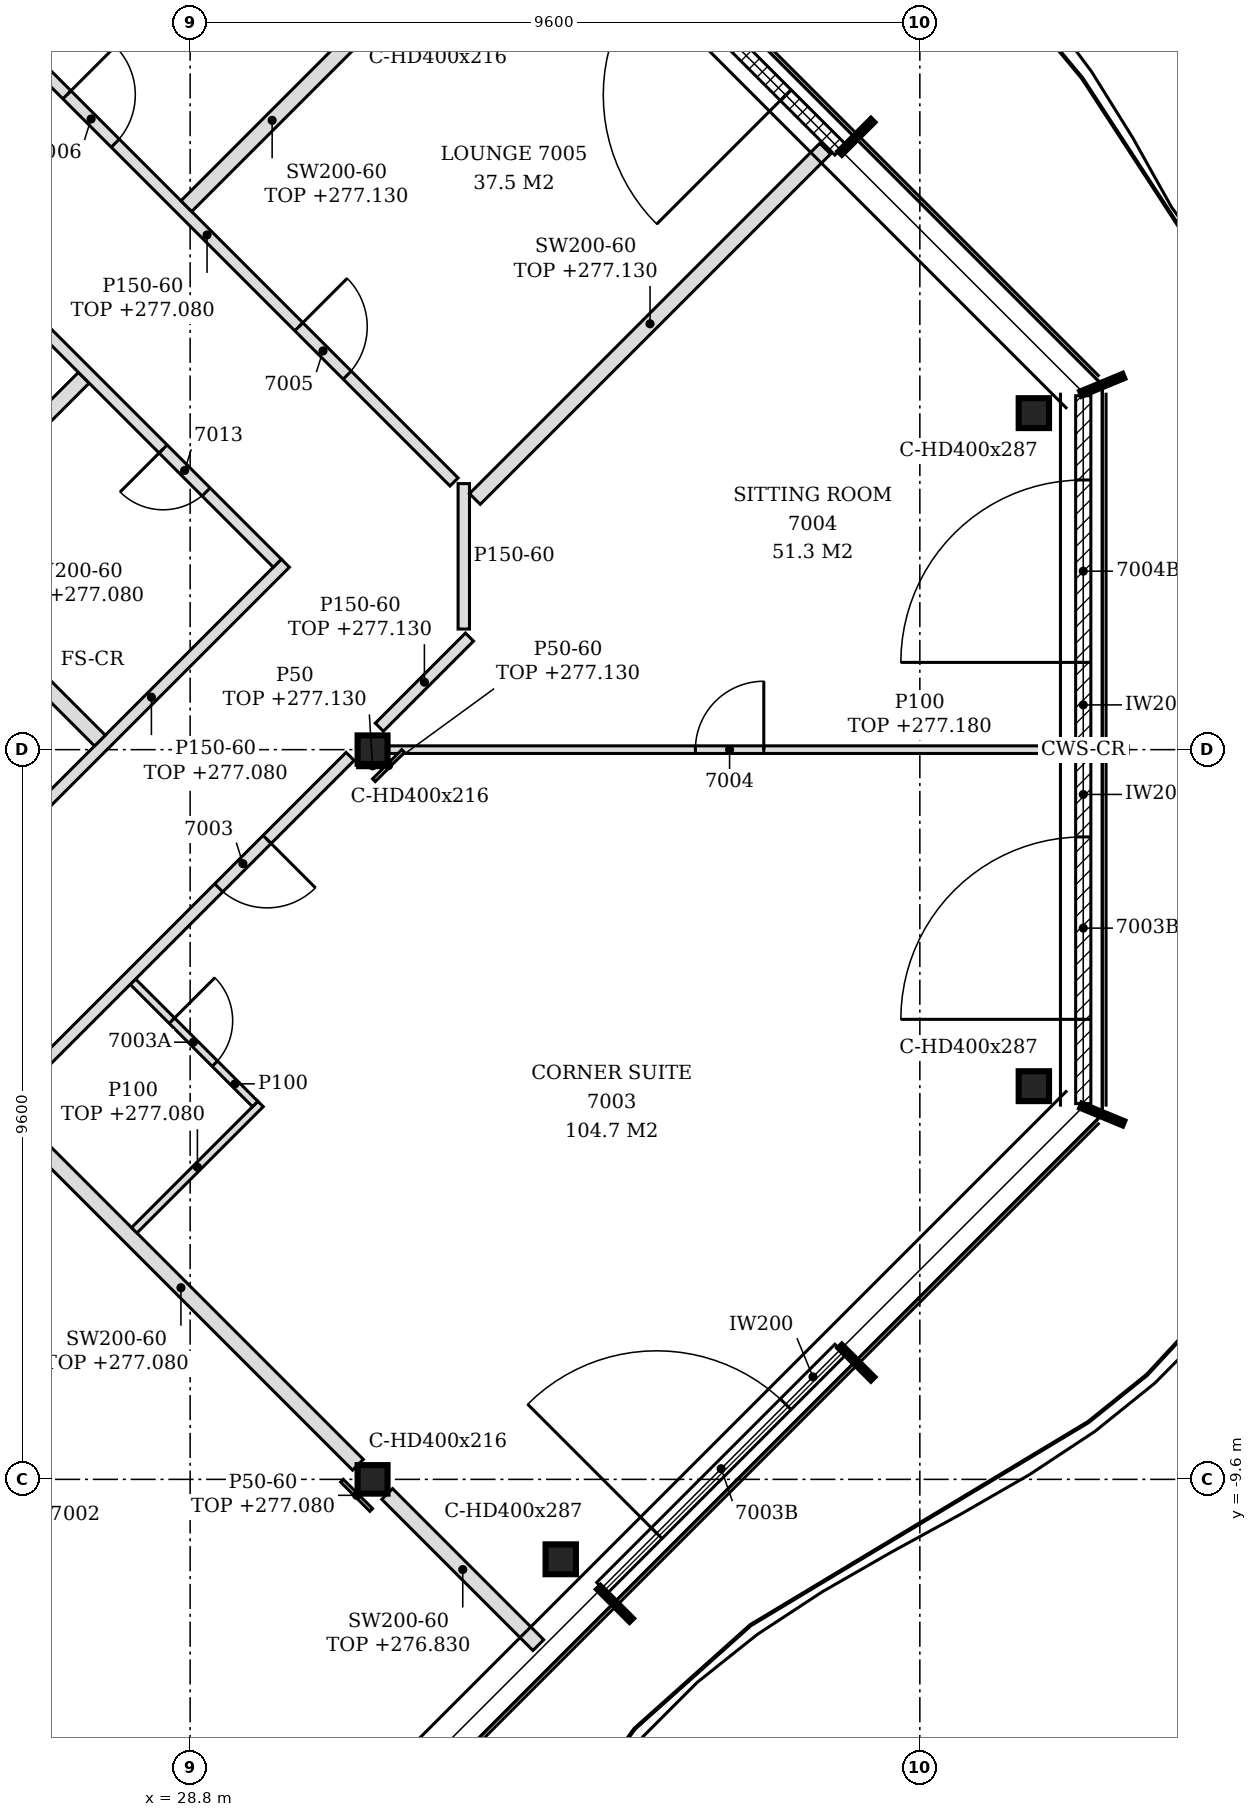
"""IFC4 building model, lengths in metres.
Left out: names, types, materials, properties, quantities, classifications, styles, units other than length and angle.
Written with IfcOpenShell. Run it as: python <this file> out.ifc"""

import sys

from ifc_helpers import new_model, si_unit, direction, frame, frame_2d, origin, origin_2d, place, context, subcontext, project, spatial, polyline, rectangle, i_section, outline, extrude, element, fill, save


model = new_model("IFC4")
c1 = context("Model", 3, precision=1e-05, world=origin(), true_north=direction((0.0, 1.0)))
c2 = subcontext(c1, "Body", "Model", "MODEL_VIEW")
j1 = project(units=[si_unit("LENGTHUNIT", "METRE"), si_unit("PLANEANGLEUNIT", "RADIAN")], contexts=[c1])
p1 = place(None, origin())
s1 = spatial("IfcSite", under=j1, at=p1, CompositionType="ELEMENT")
p2 = place(p1, origin())
s2 = spatial("IfcBuilding", under=s1, at=p2, CompositionType="ELEMENT")
p3 = place(p2, frame((0.0, 0.0, 274.2)))
s3 = spatial("IfcBuildingStorey", under=s2, at=p3, CompositionType="ELEMENT", Elevation=274.2)
for number, where, z_axis, x_axis in (
    (1, (33.676, -10.652, -0.15), (0.0, 0.0, 1.0), (1.0, 0.0, 0.0)),
    (2, (39.9, -4.427, -0.15), (0.0, 0.0, 1.0), (1.0, 0.0, 0.0)),
    (3, (39.9, 4.427, -0.15), (0.0, 0.0, 1.0), (1.0, 0.0, 0.0)),
):
    element("IfcColumn", number, at=place(p3, frame(where, z_axis=z_axis, x_axis=x_axis)), inside=s3, PredefinedType="COLUMN", context=c2, shape_type="SweptSolid", body=[
        extrude(i_section(OverallWidth=0.399, OverallDepth=0.393, WebThickness=0.023, FlangeThickness=0.037, FilletRadius=0.015, at=origin_2d()), origin(), (0.0, 0.0, 1.0), 3.6),
    ])
for number, where, z_axis, x_axis in (
    (4, (31.2, -9.6, -0.15), (0.0, 0.0, 1.0), (1.0, 0.0, 0.0)),
    (5, (31.2, 0.0, -0.15), (0.0, 0.0, 1.0), (1.0, 0.0, 0.0)),
):
    element("IfcColumn", number, at=place(p3, frame(where, z_axis=z_axis, x_axis=x_axis)), inside=s3, PredefinedType="COLUMN", context=c2, shape_type="SweptSolid", body=[
        extrude(i_section(OverallWidth=0.394, OverallDepth=0.375, WebThickness=0.017, FlangeThickness=0.028, FilletRadius=0.015, at=origin_2d()), origin(), (0.0, 0.0, 1.0), 3.6),
    ])
p4 = place(p3, frame((34.22, -11.026, 0.0), z_axis=(0.0, 0.0, 1.0), x_axis=(0.707134329907, 0.707079231393, 0.0)))
e6 = element("IfcWall", 6, at=p4, inside=s3, PredefinedType="NOTDEFINED", context=c2, shape_type="SweptSolid", body=[
    extrude(rectangle(XDim=4.431, YDim=0.2, at=frame_2d((2.215, 0.0))), origin(), (0.0, 0.0, 1.0), 3.45),
])
p5 = place(p4, frame((1.015, 0.0, 0.0)))
e7 = element("IfcOpeningElement", 7, at=p5, cuts=e6, PredefinedType="OPENING", context=c2, shape_type="SweptSolid", body=[
    extrude(rectangle(XDim=2.4, YDim=2.4, at=frame_2d((1.2, 1.2))), frame((0.0, 0.11, 0.0), z_axis=(0.0, -1.0, 0.0), x_axis=(1.0, 0.0, 0.0)), (0.0, 0.0, 1.0), 0.22),
])
p6 = place(p3, frame((40.55, -4.656, 0.0), z_axis=(0.0, 0.0, 1.0), x_axis=(0.0, 1.0, 0.0)))
e8 = element("IfcWall", 8, at=p6, inside=s3, PredefinedType="NOTDEFINED", context=c2, shape_type="SweptSolid", body=[
    extrude(rectangle(XDim=4.626, YDim=0.2, at=frame_2d((2.313, 0.0))), origin(), (0.0, 0.0, 1.0), 3.45),
])
p7 = place(p6, frame((1.108, 0.0, 0.0)))
e9 = element("IfcOpeningElement", 9, at=p7, cuts=e8, PredefinedType="OPENING", context=c2, shape_type="SweptSolid", body=[
    extrude(rectangle(XDim=2.4, YDim=2.4, at=frame_2d((1.2, 1.2))), frame((0.0, 0.11, 0.0), z_axis=(0.0, -1.0, 0.0), x_axis=(1.0, 0.0, 0.0)), (0.0, 0.0, 1.0), 0.22),
])
p8 = place(p3, frame((40.55, 0.03, 0.0), z_axis=(0.0, 0.0, 1.0), x_axis=(0.0, 1.0, 0.0)))
e10 = element("IfcWall", 10, at=p8, inside=s3, PredefinedType="NOTDEFINED", context=c2, shape_type="SweptSolid", body=[
    extrude(rectangle(XDim=4.626, YDim=0.2, at=frame_2d((2.313, 0.0))), origin(), (0.0, 0.0, 1.0), 3.45),
])
p9 = place(p8, frame((1.118, 0.0, 0.0)))
e11 = element("IfcOpeningElement", 11, at=p9, cuts=e10, PredefinedType="OPENING", context=c2, shape_type="SweptSolid", body=[
    extrude(rectangle(XDim=2.4, YDim=2.4, at=frame_2d((1.2, 1.2))), frame((0.0, 0.11, 0.0), z_axis=(0.0, -1.0, 0.0), x_axis=(1.0, 0.0, 0.0)), (0.0, 0.0, 1.0), 0.22),
])
p10 = place(p3, frame((37.353, 7.893, 0.0), z_axis=(0.0, 0.0, 1.0), x_axis=(-0.707134329907, 0.707079231393, 0.0)))
e12 = element("IfcWall", 12, at=p10, inside=s3, PredefinedType="NOTDEFINED", context=c2, shape_type="SweptSolid", body=[
    extrude(rectangle(XDim=4.431, YDim=0.2, at=frame_2d((2.215, 0.0))), origin(), (0.0, 0.0, 1.0), 3.45),
])
p11 = place(p10, frame((1.015, 0.0, 0.0)))
e13 = element("IfcOpeningElement", 13, at=p11, cuts=e12, PredefinedType="OPENING", context=c2, shape_type="SweptSolid", body=[
    extrude(rectangle(XDim=2.4, YDim=2.4, at=frame_2d((1.2, 1.2))), frame((0.0, 0.11, 0.0), z_axis=(0.0, -1.0, 0.0), x_axis=(1.0, 0.0, 0.0)), (0.0, 0.0, 1.0), 0.22),
])
p12 = place(p3, frame((13.122, -17.872, 0.0), z_axis=(0.0, 0.0, 1.0), x_axis=(0.707101927234, 0.707111635106, 0.0)))
e14 = element("IfcWall", 14, at=p12, inside=s3, PredefinedType="PARTITIONING", context=c2, shape_type="SweptSolid", body=[
    extrude(rectangle(XDim=25.149, YDim=0.15, at=frame_2d((12.574, 0.0))), origin(), (0.0, 0.0, 1.0), 2.73),
])
p13 = place(p12, frame((4.672, 0.0, 0.0)))
e15 = element("IfcOpeningElement", 15, at=p13, cuts=e14, PredefinedType="OPENING", context=c2, shape_type="SweptSolid", body=[
    extrude(rectangle(XDim=0.9, YDim=2.1, at=frame_2d((0.45, 1.05))), frame((0.0, 0.085, 0.0), z_axis=(0.0, -1.0, 0.0), x_axis=(1.0, 0.0, 0.0)), (0.0, 0.0, 1.0), 0.17),
])
p14 = place(p12, frame((14.284, 0.0, 0.0)))
e16 = element("IfcOpeningElement", 16, at=p14, cuts=e14, PredefinedType="OPENING", context=c2, shape_type="SweptSolid", body=[
    extrude(rectangle(XDim=0.9, YDim=2.1, at=frame_2d((0.45, 1.05))), frame((0.0, 0.085, 0.0), z_axis=(0.0, -1.0, 0.0), x_axis=(1.0, 0.0, 0.0)), (0.0, 0.0, 1.0), 0.17),
])
p15 = place(p12, frame((22.704, 0.0, 0.0)))
e17 = element("IfcOpeningElement", 17, at=p15, cuts=e14, PredefinedType="OPENING", context=c2, shape_type="SweptSolid", body=[
    extrude(rectangle(XDim=0.9, YDim=2.1, at=frame_2d((0.45, 1.05))), frame((0.0, 0.085, 0.0), z_axis=(0.0, -1.0, 0.0), x_axis=(1.0, 0.0, 0.0)), (0.0, 0.0, 1.0), 0.17),
])
p16 = place(p3, frame((27.254, -16.677, 0.0), z_axis=(0.0, 0.0, 1.0), x_axis=(-0.707120235152, 0.707093326965, 0.0)))
e18 = element("IfcWall", 18, at=p16, inside=s3, PredefinedType="PARTITIONING", context=c2, shape_type="SweptSolid", body=[
    extrude(rectangle(XDim=9.073, YDim=0.2, at=frame_2d((4.537, 0.0))), origin(), (0.0, 0.0, 1.0), 2.93),
])
p17 = place(p3, frame((33.381, -11.781, 0.0), z_axis=(0.0, 0.0, 1.0), x_axis=(-0.707106781187, 0.707106781187, 0.0)))
e19 = element("IfcWall", 19, at=p17, inside=s3, PredefinedType="PARTITIONING", context=c2, shape_type="SweptSolid", body=[
    extrude(rectangle(XDim=2.812, YDim=0.2, at=frame_2d((1.406, 0.0))), origin(), (0.0, 0.0, 1.0), 2.63),
])
p18 = place(p3, frame((31.008, -9.408, 0.0), z_axis=(0.0, 0.0, 1.0), x_axis=(-0.707106781187, 0.707106781187, 0.0)))
e20 = element("IfcWall", 20, at=p18, inside=s3, PredefinedType="PARTITIONING", context=c2, shape_type="SweptSolid", body=[
    extrude(rectangle(XDim=6.587, YDim=0.2, at=frame_2d((3.293, 0.0))), origin(), (0.0, 0.0, 1.0), 2.88),
])
p19 = place(p3, frame((28.065, -6.323, 0.0), z_axis=(0.0, 0.0, 1.0), x_axis=(0.707106781187, 0.707106781187, 0.0)))
e21 = element("IfcWall", 21, at=p19, inside=s3, PredefinedType="PARTITIONING", context=c2, shape_type="SweptSolid", body=[
    extrude(rectangle(XDim=2.35, YDim=0.1, at=frame_2d((1.175, 0.0))), origin(), (0.0, 0.0, 1.0), 2.88),
])
p20 = place(p3, frame((29.656, -4.662, 0.0), z_axis=(0.0, 0.0, 1.0), x_axis=(-0.707053116953, 0.707160441348, 0.0)))
e22 = element("IfcWall", 22, at=p20, inside=s3, PredefinedType="PARTITIONING", context=c2, shape_type="SweptSolid", body=[
    extrude(rectangle(XDim=2.275, YDim=0.1, at=frame_2d((1.137, 0.0))), origin(), (0.0, 0.0, 1.0), 3.45),
])
p21 = place(p20, frame((0.75, 0.0, 0.0)))
e23 = element("IfcOpeningElement", 23, at=p21, cuts=e22, PredefinedType="OPENING", context=c2, shape_type="SweptSolid", body=[
    extrude(rectangle(XDim=0.8, YDim=2.1, at=frame_2d((0.4, 1.05))), frame((0.0, 0.06, 0.0), z_axis=(0.0, -1.0, 0.0), x_axis=(1.0, 0.0, 0.0)), (0.0, 0.0, 1.0), 0.12),
])
p22 = place(p3, frame((26.528, -1.072, 0.0), z_axis=(0.0, 0.0, 1.0), x_axis=(0.707106781187, 0.707106781187, 0.0)))
e24 = element("IfcWall", 24, at=p22, inside=s3, PredefinedType="PARTITIONING", context=c2, shape_type="SweptSolid", body=[
    extrude(rectangle(XDim=4.985, YDim=0.15, at=frame_2d((2.492, 0.0))), origin(), (0.0, 0.0, 1.0), 2.88),
])
p23 = place(p3, frame((31.397, 0.0, 0.0), z_axis=(0.0, 0.0, 1.0), x_axis=(1.0, 0.0, 0.0)))
e25 = element("IfcWall", 25, at=p23, inside=s3, PredefinedType="PARTITIONING", context=c2, shape_type="SweptSolid", body=[
    extrude(outline(polyline([(0.0, 0.0), (9.053, 0.0), (9.053, 2.98), (8.653, 2.98), (8.651, 2.93), (8.353, 2.93), (8.351, 2.98), (0.0, 2.98), (0.0, 0.0)])), frame((0.0, 0.05, 0.0), z_axis=(0.0, -1.0, 0.0), x_axis=(1.0, 0.0, 0.0)), (0.0, 0.0, 1.0), 0.1),
])
p24 = place(p23, frame((4.05, 0.0, 0.0)))
e26 = element("IfcOpeningElement", 26, at=p24, cuts=e25, PredefinedType="OPENING", context=c2, shape_type="SweptSolid", body=[
    extrude(rectangle(XDim=0.9, YDim=2.1, at=frame_2d((0.45, 1.05))), frame((0.0, 0.06, 0.0), z_axis=(0.0, -1.0, 0.0), x_axis=(1.0, 0.0, 0.0)), (0.0, 0.0, 1.0), 0.12),
])
p25 = place(p3, frame((27.613, 0.119, 0.0), z_axis=(0.0, 0.0, 1.0), x_axis=(-0.706999846325, 0.707213699878, 0.0)))
e27 = element("IfcWall", 27, at=p25, inside=s3, PredefinedType="PARTITIONING", context=c2, shape_type="SweptSolid", body=[
    extrude(rectangle(XDim=3.425, YDim=0.2, at=frame_2d((1.712, 0.0))), origin(), (0.0, 0.0, 1.0), 2.88),
])
p26 = place(p3, frame((31.289, 0.295, 0.0), z_axis=(0.0, 0.0, 1.0), x_axis=(0.707106781187, 0.707106781187, 0.0)))
e28 = element("IfcWall", 28, at=p26, inside=s3, PredefinedType="PARTITIONING", context=c2, shape_type="SweptSolid", body=[
    extrude(rectangle(XDim=1.677, YDim=0.15, at=frame_2d((0.838, 0.0))), origin(), (0.0, 0.0, 1.0), 2.93),
])
p27 = place(p3, frame((32.4, 1.587, 0.0), z_axis=(0.0, 0.0, 1.0), x_axis=(0.0, 1.0, 0.0)))
e29 = element("IfcWall", 29, at=p27, inside=s3, PredefinedType="PARTITIONING", context=c2, shape_type="SweptSolid", body=[
    extrude(rectangle(XDim=1.913, YDim=0.15, at=frame_2d((0.957, 0.0))), origin(), (0.0, 0.0, 1.0), 3.45),
])
p28 = place(p3, frame((25.05, 2.541, 0.0), z_axis=(0.0, 0.0, 1.0), x_axis=(0.706959910949, 0.707253620925, 0.0)))
e30 = element("IfcWall", 30, at=p28, inside=s3, PredefinedType="PARTITIONING", context=c2, shape_type="SweptSolid", body=[
    extrude(rectangle(XDim=3.325, YDim=0.2, at=frame_2d((1.663, 0.0))), origin(), (0.0, 0.0, 1.0), 2.88),
])
p29 = place(p3, frame((29.947, 2.453, 0.0), z_axis=(0.0, 0.0, 1.0), x_axis=(-0.707098603185, 0.707114959093, 0.0)))
e31 = element("IfcWall", 31, at=p29, inside=s3, PredefinedType="PARTITIONING", context=c2, shape_type="SweptSolid", body=[
    extrude(rectangle(XDim=14.927, YDim=0.15, at=frame_2d((7.463, 0.0))), origin(), (0.0, 0.0, 1.0), 2.88),
])
p30 = place(p29, frame((1.325, 0.0, 0.0)))
e32 = element("IfcOpeningElement", 32, at=p30, cuts=e31, PredefinedType="OPENING", context=c2, shape_type="SweptSolid", body=[
    extrude(rectangle(XDim=0.8, YDim=2.1, at=frame_2d((0.4, 1.05))), frame((0.0, 0.085, 0.0), z_axis=(0.0, -1.0, 0.0), x_axis=(1.0, 0.0, 0.0)), (0.0, 0.0, 1.0), 0.17),
])
p31 = place(p3, frame((32.546, 3.298, 0.0), z_axis=(0.0, 0.0, 1.0), x_axis=(0.707106781187, 0.707106781187, 0.0)))
e33 = element("IfcWall", 33, at=p31, inside=s3, PredefinedType="PARTITIONING", context=c2, shape_type="SweptSolid", body=[
    extrude(rectangle(XDim=6.519, YDim=0.2, at=frame_2d((3.26, 0.0))), origin(), (0.0, 0.0, 1.0), 2.93),
])
p32 = place(p3, frame((32.272, 3.522, 0.0), z_axis=(0.0, 0.0, 1.0), x_axis=(-0.707106781187, 0.707106781187, 0.0)))
e34 = element("IfcWall", 34, at=p32, inside=s3, PredefinedType="PARTITIONING", context=c2, shape_type="SweptSolid", body=[
    extrude(rectangle(XDim=13.687, YDim=0.15, at=frame_2d((6.843, 0.0))), origin(), (0.0, 0.0, 1.0), 2.88),
])
p33 = place(p32, frame((1.988, 0.0, 0.0)))
e35 = element("IfcOpeningElement", 35, at=p33, cuts=e34, PredefinedType="OPENING", context=c2, shape_type="SweptSolid", body=[
    extrude(rectangle(XDim=0.9, YDim=2.1, at=frame_2d((0.45, 1.05))), frame((0.0, 0.085, 0.0), z_axis=(0.0, -1.0, 0.0), x_axis=(1.0, 0.0, 0.0)), (0.0, 0.0, 1.0), 0.17),
])
p34 = place(p32, frame((6.303, 0.0, 0.0)))
e36 = element("IfcOpeningElement", 36, at=p34, cuts=e34, PredefinedType="OPENING", context=c2, shape_type="SweptSolid", body=[
    extrude(rectangle(XDim=0.9, YDim=2.1, at=frame_2d((0.45, 1.05))), frame((0.0, 0.085, 0.0), z_axis=(0.0, -1.0, 0.0), x_axis=(1.0, 0.0, 0.0)), (0.0, 0.0, 1.0), 0.17),
])
p35 = place(p32, frame((10.2, 0.0, 0.0)))
e37 = element("IfcOpeningElement", 37, at=p35, cuts=e34, PredefinedType="OPENING", context=c2, shape_type="SweptSolid", body=[
    extrude(rectangle(XDim=0.9, YDim=2.1, at=frame_2d((0.45, 1.05))), frame((0.0, 0.085, 0.0), z_axis=(0.0, -1.0, 0.0), x_axis=(1.0, 0.0, 0.0)), (0.0, 0.0, 1.0), 0.17),
])
p36 = place(p3, frame((28.75, 7.15, 0.0), z_axis=(0.0, 0.0, 1.0), x_axis=(0.707106781187, 0.707106781187, 0.0)))
e38 = element("IfcWall", 38, at=p36, inside=s3, PredefinedType="PARTITIONING", context=c2, shape_type="SweptSolid", body=[
    extrude(rectangle(XDim=3.193, YDim=0.2, at=frame_2d((1.597, 0.0))), origin(), (0.0, 0.0, 1.0), 2.93),
])
p37 = place(p3, frame((31.218, -0.402, 0.0), z_axis=(0.0, 0.0, 1.0), x_axis=(0.707106781187, 0.707106781187, 0.0)))
e39 = element("IfcWall", 39, at=p37, inside=s3, PredefinedType="PARTITIONING", context=c2, shape_type="SweptSolid", body=[
    extrude(rectangle(XDim=0.544, YDim=0.05, at=frame_2d((0.272, 0.0))), origin(), (0.0, 0.0, 1.0), 2.93),
])
p38 = place(p3, frame((31.182, -10.002, 0.0), z_axis=(0.0, 0.0, 1.0), x_axis=(-0.707106781187, 0.707106781187, 0.0)))
e40 = element("IfcWall", 40, at=p38, inside=s3, PredefinedType="PARTITIONING", context=c2, shape_type="SweptSolid", body=[
    extrude(rectangle(XDim=0.544, YDim=0.05, at=frame_2d((0.272, 0.0))), origin(), (0.0, 0.0, 1.0), 2.88),
])
p39 = place(p3, frame((31.003, -0.212, 0.0), z_axis=(0.0, 0.0, 1.0), x_axis=(1.0, 0.0, 0.0)))
e41 = element("IfcWall", 41, at=p39, inside=s3, PredefinedType="PARTITIONING", context=c2, shape_type="SweptSolid", body=[
    extrude(rectangle(XDim=0.394, YDim=0.05, at=frame_2d((0.197, 0.0))), origin(), (0.0, 0.0, 1.0), 2.93),
])
p40 = place(p5, origin())
e42 = element("IfcDoor", 42, at=p40, inside=s3, OperationType="SINGLE_SWING_LEFT", PredefinedType="DOOR", context=c2, shape_type="SweptSolid", body=[
    extrude(rectangle(XDim=2.4, YDim=2.4, at=frame_2d((1.2, 1.2))), frame((0.0, 0.025, 0.0), z_axis=(0.0, -1.0, 0.0), x_axis=(1.0, 0.0, 0.0)), (0.0, 0.0, 1.0), 0.05),
])
fill(e7, e42)
p41 = place(p7, origin())
e43 = element("IfcDoor", 43, at=p41, inside=s3, OperationType="SINGLE_SWING_LEFT", PredefinedType="DOOR", context=c2, shape_type="SweptSolid", body=[
    extrude(rectangle(XDim=2.4, YDim=2.4, at=frame_2d((1.2, 1.2))), frame((0.0, 0.025, 0.0), z_axis=(0.0, -1.0, 0.0), x_axis=(1.0, 0.0, 0.0)), (0.0, 0.0, 1.0), 0.05),
])
fill(e9, e43)
p42 = place(p9, origin())
e44 = element("IfcDoor", 44, at=p42, inside=s3, OperationType="SINGLE_SWING_LEFT", PredefinedType="DOOR", context=c2, shape_type="SweptSolid", body=[
    extrude(rectangle(XDim=2.4, YDim=2.4, at=frame_2d((1.2, 1.2))), frame((0.0, 0.025, 0.0), z_axis=(0.0, -1.0, 0.0), x_axis=(1.0, 0.0, 0.0)), (0.0, 0.0, 1.0), 0.05),
])
fill(e11, e44)
p43 = place(p11, origin())
e45 = element("IfcDoor", 45, at=p43, inside=s3, OperationType="SINGLE_SWING_LEFT", PredefinedType="DOOR", context=c2, shape_type="SweptSolid", body=[
    extrude(rectangle(XDim=2.4, YDim=2.4, at=frame_2d((1.2, 1.2))), frame((0.0, 0.025, 0.0), z_axis=(0.0, -1.0, 0.0), x_axis=(1.0, 0.0, 0.0)), (0.0, 0.0, 1.0), 0.05),
])
fill(e13, e45)
p44 = place(p15, frame((0.9, 0.0, 0.0), z_axis=(0.0, 0.0, 1.0), x_axis=(-1.0, 0.0, 0.0)))
e46 = element("IfcDoor", 46, at=p44, inside=s3, OperationType="SINGLE_SWING_LEFT", PredefinedType="DOOR", context=c2, shape_type="SweptSolid", body=[
    extrude(rectangle(XDim=0.9, YDim=2.1, at=frame_2d((0.45, 1.05))), frame((0.0, 0.025, 0.0), z_axis=(0.0, -1.0, 0.0), x_axis=(1.0, 0.0, 0.0)), (0.0, 0.0, 1.0), 0.05),
])
fill(e17, e46)
p45 = place(p21, frame((0.8, 0.0, 0.0), z_axis=(0.0, 0.0, 1.0), x_axis=(-1.0, 0.0, 0.0)))
e47 = element("IfcDoor", 47, at=p45, inside=s3, OperationType="SINGLE_SWING_LEFT", PredefinedType="DOOR", context=c2, shape_type="SweptSolid", body=[
    extrude(rectangle(XDim=0.8, YDim=2.1, at=frame_2d((0.4, 1.05))), frame((0.0, 0.025, 0.0), z_axis=(0.0, -1.0, 0.0), x_axis=(1.0, 0.0, 0.0)), (0.0, 0.0, 1.0), 0.05),
])
fill(e23, e47)
p46 = place(p24, origin())
e48 = element("IfcDoor", 48, at=p46, inside=s3, OperationType="SINGLE_SWING_RIGHT", PredefinedType="DOOR", context=c2, shape_type="SweptSolid", body=[
    extrude(rectangle(XDim=0.9, YDim=2.1, at=frame_2d((0.45, 1.05))), frame((0.0, 0.025, 0.0), z_axis=(0.0, -1.0, 0.0), x_axis=(1.0, 0.0, 0.0)), (0.0, 0.0, 1.0), 0.05),
])
fill(e26, e48)
p47 = place(p33, frame((0.9, 0.0, 0.0), z_axis=(0.0, 0.0, 1.0), x_axis=(-1.0, 0.0, 0.0)))
e49 = element("IfcDoor", 49, at=p47, inside=s3, OperationType="SINGLE_SWING_LEFT", PredefinedType="DOOR", context=c2, shape_type="SweptSolid", body=[
    extrude(rectangle(XDim=0.9, YDim=2.1, at=frame_2d((0.45, 1.05))), frame((0.0, 0.025, 0.0), z_axis=(0.0, -1.0, 0.0), x_axis=(1.0, 0.0, 0.0)), (0.0, 0.0, 1.0), 0.05),
])
fill(e35, e49)
p48 = place(p34, frame((0.9, 0.0, 0.0), z_axis=(0.0, 0.0, 1.0), x_axis=(-1.0, 0.0, 0.0)))
e50 = element("IfcDoor", 50, at=p48, inside=s3, OperationType="SINGLE_SWING_LEFT", PredefinedType="DOOR", context=c2, shape_type="SweptSolid", body=[
    extrude(rectangle(XDim=0.9, YDim=2.1, at=frame_2d((0.45, 1.05))), frame((0.0, 0.025, 0.0), z_axis=(0.0, -1.0, 0.0), x_axis=(1.0, 0.0, 0.0)), (0.0, 0.0, 1.0), 0.05),
])
fill(e36, e50)
p49 = place(p30, origin())
e51 = element("IfcDoor", 51, at=p49, inside=s3, OperationType="SINGLE_SWING_RIGHT", PredefinedType="DOOR", context=c2, shape_type="SweptSolid", body=[
    extrude(rectangle(XDim=0.8, YDim=2.1, at=frame_2d((0.4, 1.05))), frame((0.0, 0.025, 0.0), z_axis=(0.0, -1.0, 0.0), x_axis=(1.0, 0.0, 0.0)), (0.0, 0.0, 1.0), 0.05),
])
fill(e32, e51)
save(model, sys.argv[1])
